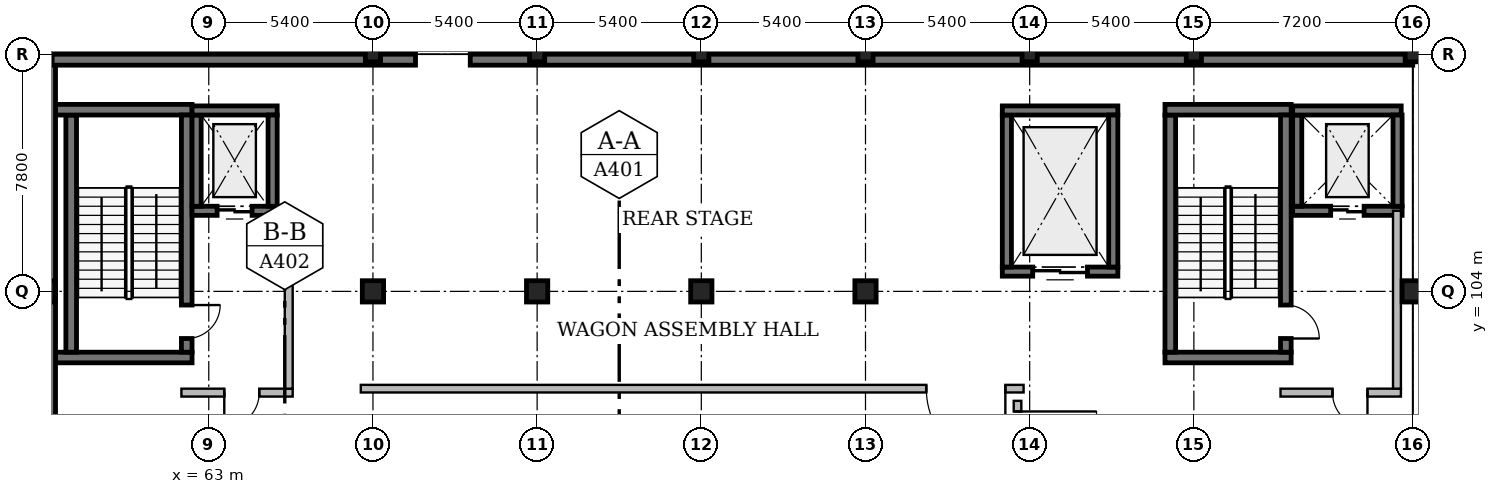
"""IFC4 building model, lengths in metres.
Left out: names, types, materials, properties, quantities, classifications, styles, units other than length and angle.
Written with IfcOpenShell. Run it as: python <this file> out.ifc"""

import sys

from ifc_helpers import new_model, si_unit, direction, frame, frame_2d, origin, origin_2d, place, context, subcontext, project, spatial, rectangle, extrude, element, fill, save


model = new_model("IFC4")
c1 = context("Model", 3, precision=1e-05, world=origin(), true_north=direction((0.0, 1.0)))
c2 = subcontext(c1, "Body", "Model", "MODEL_VIEW")
j1 = project(units=[si_unit("LENGTHUNIT", "METRE"), si_unit("PLANEANGLEUNIT", "RADIAN")], contexts=[c1])
p1 = place(None, origin())
s1 = spatial("IfcSite", under=j1, at=p1, CompositionType="ELEMENT")
p2 = place(p1, origin())
s2 = spatial("IfcBuilding", under=s1, at=p2, CompositionType="ELEMENT")
p3 = place(p2, origin())
s3 = spatial("IfcBuildingStorey", under=s2, at=p3, CompositionType="ELEMENT", Elevation=0.0)
p4 = place(p3, frame((68.4, 104.0, 0.0), z_axis=(0.0, 0.0, 1.0), x_axis=(1.0, 0.0, 0.0)))
e1 = element("IfcColumn", 1, at=p4, inside=s3, PredefinedType="COLUMN", context=c2, shape_type="SweptSolid", body=[
    extrude(rectangle(XDim=0.7, YDim=0.7, at=origin_2d()), origin(), (0.0, 0.0, 1.0), 4.8),
])
p5 = place(p3, frame((68.4, 111.8, 0.0), z_axis=(0.0, 0.0, 1.0), x_axis=(1.0, 0.0, 0.0)))
e2 = element("IfcColumn", 2, at=p5, inside=s3, PredefinedType="COLUMN", context=c2, shape_type="SweptSolid", body=[
    extrude(rectangle(XDim=0.5, YDim=0.5, at=origin_2d()), origin(), (0.0, 0.0, 1.0), 4.8),
])
p6 = place(p3, frame((73.8, 104.0, 0.0), z_axis=(0.0, 0.0, 1.0), x_axis=(1.0, 0.0, 0.0)))
e3 = element("IfcColumn", 3, at=p6, inside=s3, PredefinedType="COLUMN", context=c2, shape_type="SweptSolid", body=[
    extrude(rectangle(XDim=0.7, YDim=0.7, at=origin_2d()), origin(), (0.0, 0.0, 1.0), 4.8),
])
p7 = place(p3, frame((73.8, 111.8, 0.0), z_axis=(0.0, 0.0, 1.0), x_axis=(1.0, 0.0, 0.0)))
e4 = element("IfcColumn", 4, at=p7, inside=s3, PredefinedType="COLUMN", context=c2, shape_type="SweptSolid", body=[
    extrude(rectangle(XDim=0.5, YDim=0.5, at=origin_2d()), origin(), (0.0, 0.0, 1.0), 4.8),
])
p8 = place(p3, frame((79.2, 104.0, 0.0), z_axis=(0.0, 0.0, 1.0), x_axis=(1.0, 0.0, 0.0)))
e5 = element("IfcColumn", 5, at=p8, inside=s3, PredefinedType="COLUMN", context=c2, shape_type="SweptSolid", body=[
    extrude(rectangle(XDim=0.7, YDim=0.7, at=origin_2d()), origin(), (0.0, 0.0, 1.0), 4.8),
])
p9 = place(p3, frame((79.2, 111.8, 0.0), z_axis=(0.0, 0.0, 1.0), x_axis=(1.0, 0.0, 0.0)))
e6 = element("IfcColumn", 6, at=p9, inside=s3, PredefinedType="COLUMN", context=c2, shape_type="SweptSolid", body=[
    extrude(rectangle(XDim=0.5, YDim=0.5, at=origin_2d()), origin(), (0.0, 0.0, 1.0), 4.8),
])
p10 = place(p3, frame((84.6, 104.0, 0.0), z_axis=(0.0, 0.0, 1.0), x_axis=(1.0, 0.0, 0.0)))
e7 = element("IfcColumn", 7, at=p10, inside=s3, PredefinedType="COLUMN", context=c2, shape_type="SweptSolid", body=[
    extrude(rectangle(XDim=0.7, YDim=0.7, at=origin_2d()), origin(), (0.0, 0.0, 1.0), 4.8),
])
for number, where, z_axis, x_axis in (
    (8, (84.6, 111.8, 0.0), (0.0, 0.0, 1.0), (1.0, 0.0, 0.0)),
    (9, (90.0, 111.8, 0.0), (0.0, 0.0, 1.0), (1.0, 0.0, 0.0)),
    (10, (95.4, 111.8, 0.0), (0.0, 0.0, 1.0), (1.0, 0.0, 0.0)),
):
    element("IfcColumn", number, at=place(p3, frame(where, z_axis=z_axis, x_axis=x_axis)), inside=s3, PredefinedType="COLUMN", context=c2, shape_type="SweptSolid", body=[
        extrude(rectangle(XDim=0.5, YDim=0.5, at=origin_2d()), origin(), (0.0, 0.0, 1.0), 4.8),
    ])
p11 = place(p3, frame((102.6, 104.0, 0.0), z_axis=(0.0, 0.0, 1.0), x_axis=(1.0, 0.0, 0.0)))
e11 = element("IfcColumn", 11, at=p11, inside=s3, PredefinedType="COLUMN", context=c2, shape_type="SweptSolid", body=[
    extrude(rectangle(XDim=0.7, YDim=0.7, at=origin_2d()), origin(), (0.0, 0.0, 1.0), 4.8),
])
p12 = place(p3, frame((102.6, 111.8, 0.0), z_axis=(0.0, 0.0, 1.0), x_axis=(1.0, 0.0, 0.0)))
e12 = element("IfcColumn", 12, at=p12, inside=s3, PredefinedType="COLUMN", context=c2, shape_type="SweptSolid", body=[
    extrude(rectangle(XDim=0.5, YDim=0.5, at=origin_2d()), origin(), (0.0, 0.0, 1.0), 4.8),
])
p13 = place(p3, frame((57.6, 104.0, 0.0), z_axis=(0.0, 0.0, 1.0), x_axis=(1.0, 0.0, 0.0)))
e13 = element("IfcColumn", 13, at=p13, inside=s3, PredefinedType="COLUMN", context=c2, shape_type="SweptSolid", body=[
    extrude(rectangle(XDim=0.7, YDim=0.7, at=origin_2d()), origin(), (0.0, 0.0, 1.0), 4.8),
])
p14 = place(p3, frame((57.6, 111.8, 0.0), z_axis=(0.0, 0.0, 1.0), x_axis=(1.0, 0.0, 0.0)))
e14 = element("IfcColumn", 14, at=p14, inside=s3, PredefinedType="COLUMN", context=c2, shape_type="SweptSolid", body=[
    extrude(rectangle(XDim=0.5, YDim=0.5, at=origin_2d()), origin(), (0.0, 0.0, 1.0), 4.8),
])
p15 = place(p3, frame((98.6, 101.825, 0.0), z_axis=(0.0, 0.0, 1.0), x_axis=(-1.0, 0.0, 0.0)))
e15 = element("IfcWall", 15, at=p15, inside=s3, PredefinedType="SOLIDWALL", context=c2, shape_type="SweptSolid", body=[
    extrude(rectangle(XDim=4.15, YDim=0.35, at=frame_2d((2.075, 0.0))), origin(), (0.0, 0.0, 1.0), 4.8),
])
p16 = place(p3, frame((94.625, 102.0, 0.0), z_axis=(0.0, 0.0, 1.0), x_axis=(0.0, 1.0, 0.0)))
e16 = element("IfcWall", 16, at=p16, inside=s3, PredefinedType="SOLIDWALL", context=c2, shape_type="SweptSolid", body=[
    extrude(rectangle(XDim=7.8, YDim=0.35, at=frame_2d((3.9, 0.0))), origin(), (0.0, 0.0, 1.0), 4.8),
])
p17 = place(p3, frame((94.45, 109.975, 0.0), z_axis=(0.0, 0.0, 1.0), x_axis=(1.0, 0.0, 0.0)))
e17 = element("IfcWall", 17, at=p17, inside=s3, PredefinedType="SOLIDWALL", context=c2, shape_type="SweptSolid", body=[
    extrude(rectangle(XDim=4.15, YDim=0.35, at=frame_2d((2.075, 0.0))), origin(), (0.0, 0.0, 1.0), 4.8),
])
p18 = place(p3, frame((98.425, 109.8, 0.0), z_axis=(0.0, 0.0, 1.0), x_axis=(0.0, -1.0, 0.0)))
e18 = element("IfcWall", 18, at=p18, inside=s3, PredefinedType="SOLIDWALL", context=c2, shape_type="SweptSolid", body=[
    extrude(rectangle(XDim=7.8, YDim=0.35, at=frame_2d((3.9, 0.0))), origin(), (0.0, 0.0, 1.0), 4.8),
])
p19 = place(p18, frame((6.25, 0.0, 0.0)))
e19 = element("IfcOpeningElement", 19, at=p19, cuts=e18, PredefinedType="OPENING", context=c2, shape_type="SweptSolid", body=[
    extrude(rectangle(XDim=1.1, YDim=2.15, at=frame_2d((0.55, 1.075))), frame((0.0, 0.195, 0.0), z_axis=(0.0, -1.0, 0.0), x_axis=(1.0, 0.0, 0.0)), (0.0, 0.0, 1.0), 0.39),
])
p20 = place(p3, frame((102.25, 106.65, 0.0), z_axis=(0.0, 0.0, 1.0), x_axis=(-1.0, 0.0, 0.0)))
e20 = element("IfcWall", 20, at=p20, inside=s3, PredefinedType="SOLIDWALL", context=c2, shape_type="SweptSolid", body=[
    extrude(rectangle(XDim=3.6, YDim=0.3, at=frame_2d((1.8, 0.0))), origin(), (0.0, 0.0, 1.0), 4.8),
])
p21 = place(p20, frame((1.25, 0.0, 0.0)))
e21 = element("IfcOpeningElement", 21, at=p21, cuts=e20, PredefinedType="OPENING", context=c2, shape_type="SweptSolid", body=[
    extrude(rectangle(XDim=1.1, YDim=2.1, at=frame_2d((0.55, 1.05))), frame((0.0, 0.17, 0.0), z_axis=(0.0, -1.0, 0.0), x_axis=(1.0, 0.0, 0.0)), (0.0, 0.0, 1.0), 0.34),
])
p22 = place(p3, frame((98.8, 106.8, 0.0), z_axis=(0.0, 0.0, 1.0), x_axis=(0.0, 1.0, 0.0)))
e22 = element("IfcWall", 22, at=p22, inside=s3, PredefinedType="SOLIDWALL", context=c2, shape_type="SweptSolid", body=[
    extrude(rectangle(XDim=3.0, YDim=0.3, at=frame_2d((1.5, 0.0))), origin(), (0.0, 0.0, 1.0), 4.8),
])
p23 = place(p3, frame((98.65, 109.95, 0.0), z_axis=(0.0, 0.0, 1.0), x_axis=(1.0, 0.0, 0.0)))
e23 = element("IfcWall", 23, at=p23, inside=s3, PredefinedType="SOLIDWALL", context=c2, shape_type="SweptSolid", body=[
    extrude(rectangle(XDim=3.57, YDim=0.3, at=frame_2d((1.785, 0.0))), origin(), (0.0, 0.0, 1.0), 4.8),
])
p24 = place(p3, frame((102.1, 109.8, 0.0), z_axis=(0.0, 0.0, 1.0), x_axis=(0.0, -1.0, 0.0)))
e24 = element("IfcWall", 24, at=p24, inside=s3, PredefinedType="SOLIDWALL", context=c2, shape_type="SweptSolid", body=[
    extrude(rectangle(XDim=3.0, YDim=0.3, at=frame_2d((1.5, 0.0))), origin(), (0.0, 0.0, 1.0), 4.8),
])
p25 = place(p3, frame((102.21, 100.67, 0.0), z_axis=(0.0, 0.0, 1.0), x_axis=(-1.0, 0.0, 0.0)))
e25 = element("IfcWall", 25, at=p25, inside=s3, PredefinedType="SOLIDWALL", context=c2, shape_type="SweptSolid", body=[
    extrude(rectangle(XDim=3.96, YDim=0.26, at=frame_2d((1.98, 0.0))), origin(), (0.0, 0.0, 1.0), 4.54),
])
p26 = place(p25, frame((1.1, 0.0, 0.0)))
e26 = element("IfcOpeningElement", 26, at=p26, cuts=e25, PredefinedType="OPENING", context=c2, shape_type="SweptSolid", body=[
    extrude(rectangle(XDim=1.15, YDim=2.2, at=frame_2d((0.575, 1.1))), frame((0.0, 0.15, 0.0), z_axis=(0.0, -1.0, 0.0), x_axis=(1.0, 0.0, 0.0)), (0.0, 0.0, 1.0), 0.3),
])
p27 = place(p3, frame((102.08, 106.65, 0.0), z_axis=(0.0, 0.0, 1.0), x_axis=(0.0, -1.0, 0.0)))
e27 = element("IfcWall", 27, at=p27, inside=s3, PredefinedType="SOLIDWALL", context=c2, shape_type="SweptSolid", body=[
    extrude(rectangle(XDim=5.85, YDim=0.26, at=frame_2d((2.925, 0.0))), origin(), (0.0, 0.0, 1.0), 4.54),
])
p28 = place(p3, frame((62.45, 101.825, 0.0), z_axis=(0.0, 0.0, 1.0), x_axis=(-1.0, 0.0, 0.0)))
e28 = element("IfcWall", 28, at=p28, inside=s3, PredefinedType="SOLIDWALL", context=c2, shape_type="SweptSolid", body=[
    extrude(rectangle(XDim=4.49, YDim=0.35, at=frame_2d((2.245, 0.0))), origin(), (0.0, 0.0, 1.0), 4.8),
])
p29 = place(p3, frame((58.475, 102.0, 0.0), z_axis=(0.0, 0.0, 1.0), x_axis=(0.0, 1.0, 0.0)))
e29 = element("IfcWall", 29, at=p29, inside=s3, PredefinedType="SOLIDWALL", context=c2, shape_type="SweptSolid", body=[
    extrude(rectangle(XDim=7.8, YDim=0.35, at=frame_2d((3.9, 0.0))), origin(), (0.0, 0.0, 1.0), 4.8),
])
p30 = place(p3, frame((57.96, 109.975, 0.0), z_axis=(0.0, 0.0, 1.0), x_axis=(1.0, 0.0, 0.0)))
e30 = element("IfcWall", 30, at=p30, inside=s3, PredefinedType="SOLIDWALL", context=c2, shape_type="SweptSolid", body=[
    extrude(rectangle(XDim=4.49, YDim=0.35, at=frame_2d((2.245, 0.0))), origin(), (0.0, 0.0, 1.0), 4.8),
])
p31 = place(p3, frame((62.275, 109.8, 0.0), z_axis=(0.0, 0.0, 1.0), x_axis=(0.0, -1.0, 0.0)))
e31 = element("IfcWall", 31, at=p31, inside=s3, PredefinedType="SOLIDWALL", context=c2, shape_type="SweptSolid", body=[
    extrude(rectangle(XDim=7.8, YDim=0.35, at=frame_2d((3.9, 0.0))), origin(), (0.0, 0.0, 1.0), 4.8),
])
p32 = place(p31, frame((6.25, 0.0, 0.0)))
e32 = element("IfcOpeningElement", 32, at=p32, cuts=e31, PredefinedType="OPENING", context=c2, shape_type="SweptSolid", body=[
    extrude(rectangle(XDim=1.1, YDim=2.15, at=frame_2d((0.55, 1.075))), frame((0.0, 0.195, 0.0), z_axis=(0.0, -1.0, 0.0), x_axis=(1.0, 0.0, 0.0)), (0.0, 0.0, 1.0), 0.39),
])
p33 = place(p3, frame((65.25, 106.65, 0.0), z_axis=(0.0, 0.0, 1.0), x_axis=(-1.0, 0.0, 0.0)))
e33 = element("IfcWall", 33, at=p33, inside=s3, PredefinedType="SOLIDWALL", context=c2, shape_type="SweptSolid", body=[
    extrude(rectangle(XDim=2.8, YDim=0.3, at=frame_2d((1.4, 0.0))), origin(), (0.0, 0.0, 1.0), 4.8),
])
p34 = place(p33, frame((0.825, 0.0, 0.0)))
e34 = element("IfcOpeningElement", 34, at=p34, cuts=e33, PredefinedType="OPENING", context=c2, shape_type="SweptSolid", body=[
    extrude(rectangle(XDim=1.15, YDim=2.1, at=frame_2d((0.575, 1.05))), frame((0.0, 0.17, 0.0), z_axis=(0.0, -1.0, 0.0), x_axis=(1.0, 0.0, 0.0)), (0.0, 0.0, 1.0), 0.34),
])
p35 = place(p3, frame((62.6, 106.8, 0.0), z_axis=(0.0, 0.0, 1.0), x_axis=(0.0, 1.0, 0.0)))
e35 = element("IfcWall", 35, at=p35, inside=s3, PredefinedType="SOLIDWALL", context=c2, shape_type="SweptSolid", body=[
    extrude(rectangle(XDim=3.0, YDim=0.3, at=frame_2d((1.5, 0.0))), origin(), (0.0, 0.0, 1.0), 4.8),
])
p36 = place(p3, frame((62.45, 109.95, 0.0), z_axis=(0.0, 0.0, 1.0), x_axis=(1.0, 0.0, 0.0)))
e36 = element("IfcWall", 36, at=p36, inside=s3, PredefinedType="SOLIDWALL", context=c2, shape_type="SweptSolid", body=[
    extrude(rectangle(XDim=2.8, YDim=0.3, at=frame_2d((1.4, 0.0))), origin(), (0.0, 0.0, 1.0), 4.8),
])
p37 = place(p3, frame((65.1, 109.8, 0.0), z_axis=(0.0, 0.0, 1.0), x_axis=(0.0, -1.0, 0.0)))
e37 = element("IfcWall", 37, at=p37, inside=s3, PredefinedType="SOLIDWALL", context=c2, shape_type="SweptSolid", body=[
    extrude(rectangle(XDim=3.0, YDim=0.3, at=frame_2d((1.5, 0.0))), origin(), (0.0, 0.0, 1.0), 4.8),
])
p38 = place(p3, frame((65.76, 100.67, 0.0), z_axis=(0.0, 0.0, 1.0), x_axis=(-1.0, 0.0, 0.0)))
e38 = element("IfcWall", 38, at=p38, inside=s3, PredefinedType="SOLIDWALL", context=c2, shape_type="SweptSolid", body=[
    extrude(rectangle(XDim=3.66, YDim=0.26, at=frame_2d((1.83, 0.0))), origin(), (0.0, 0.0, 1.0), 4.54),
])
p39 = place(p38, frame((1.1, 0.0, 0.0)))
e39 = element("IfcOpeningElement", 39, at=p39, cuts=e38, PredefinedType="OPENING", context=c2, shape_type="SweptSolid", body=[
    extrude(rectangle(XDim=1.15, YDim=2.2, at=frame_2d((0.575, 1.1))), frame((0.0, 0.15, 0.0), z_axis=(0.0, -1.0, 0.0), x_axis=(1.0, 0.0, 0.0)), (0.0, 0.0, 1.0), 0.3),
])
p40 = place(p3, frame((65.63, 106.65, 0.0), z_axis=(0.0, 0.0, 1.0), x_axis=(0.0, -1.0, 0.0)))
e40 = element("IfcWall", 40, at=p40, inside=s3, PredefinedType="SOLIDWALL", context=c2, shape_type="SweptSolid", body=[
    extrude(rectangle(XDim=5.85, YDim=0.26, at=frame_2d((2.925, 0.0))), origin(), (0.0, 0.0, 1.0), 4.54),
])
p41 = place(p3, frame((92.9, 104.65, 0.0), z_axis=(0.0, 0.0, 1.0), x_axis=(-1.0, 0.0, 0.0)))
e41 = element("IfcWall", 41, at=p41, inside=s3, PredefinedType="SOLIDWALL", context=c2, shape_type="SweptSolid", body=[
    extrude(rectangle(XDim=3.8, YDim=0.3, at=frame_2d((1.9, 0.0))), origin(), (0.0, 0.0, 1.0), 4.8),
])
p42 = place(p41, frame((1.0, 0.0, 0.0)))
e42 = element("IfcOpeningElement", 42, at=p42, cuts=e41, PredefinedType="OPENING", context=c2, shape_type="SweptSolid", body=[
    extrude(rectangle(XDim=1.8, YDim=2.4, at=frame_2d((0.9, 1.2))), frame((0.0, 0.17, 0.0), z_axis=(0.0, -1.0, 0.0), x_axis=(1.0, 0.0, 0.0)), (0.0, 0.0, 1.0), 0.34),
])
p43 = place(p3, frame((89.25, 104.8, 0.0), z_axis=(0.0, 0.0, 1.0), x_axis=(0.0, 1.0, 0.0)))
e43 = element("IfcWall", 43, at=p43, inside=s3, PredefinedType="SOLIDWALL", context=c2, shape_type="SweptSolid", body=[
    extrude(rectangle(XDim=5.0, YDim=0.3, at=frame_2d((2.5, 0.0))), origin(), (0.0, 0.0, 1.0), 4.8),
])
p44 = place(p3, frame((89.1, 109.95, 0.0), z_axis=(0.0, 0.0, 1.0), x_axis=(1.0, 0.0, 0.0)))
e44 = element("IfcWall", 44, at=p44, inside=s3, PredefinedType="SOLIDWALL", context=c2, shape_type="SweptSolid", body=[
    extrude(rectangle(XDim=3.8, YDim=0.3, at=frame_2d((1.9, 0.0))), origin(), (0.0, 0.0, 1.0), 4.8),
])
p45 = place(p3, frame((92.75, 109.8, 0.0), z_axis=(0.0, 0.0, 1.0), x_axis=(0.0, -1.0, 0.0)))
e45 = element("IfcWall", 45, at=p45, inside=s3, PredefinedType="SOLIDWALL", context=c2, shape_type="SweptSolid", body=[
    extrude(rectangle(XDim=5.0, YDim=0.3, at=frame_2d((2.5, 0.0))), origin(), (0.0, 0.0, 1.0), 4.8),
])
p46 = place(p3, frame((57.78, 87.8, 0.0), z_axis=(0.0, 0.0, 1.0), x_axis=(0.0, 1.0, 0.0)))
e46 = element("IfcWall", 46, at=p46, inside=s3, PredefinedType="SOLIDWALL", context=c2, shape_type="SweptSolid", body=[
    extrude(rectangle(XDim=24.0, YDim=0.36, at=frame_2d((12.0, 0.0))), origin(), (0.0, 0.0, 1.0), 4.54),
])
p47 = place(p3, frame((57.6, 111.62, 0.0), z_axis=(0.0, 0.0, 1.0), x_axis=(1.0, 0.0, 0.0)))
e47 = element("IfcWall", 47, at=p47, inside=s3, PredefinedType="SOLIDWALL", context=c2, shape_type="SweptSolid", body=[
    extrude(rectangle(XDim=45.0, YDim=0.36, at=frame_2d((22.5, 0.0))), origin(), (0.0, 0.0, 1.0), 4.54),
])
p48 = place(p47, frame((12.2, 0.0, 0.0)))
e48 = element("IfcOpeningElement", 48, at=p48, cuts=e47, PredefinedType="OPENING", context=c2, shape_type="SweptSolid", body=[
    extrude(rectangle(XDim=1.8, YDim=2.2, at=frame_2d((0.9, 1.1))), frame((0.0, 0.2, 0.0), z_axis=(0.0, -1.0, 0.0), x_axis=(1.0, 0.0, 0.0)), (0.0, 0.0, 1.0), 0.4),
])
p49 = place(p3, frame((89.6, 100.4, 0.0), z_axis=(0.0, 0.0, 1.0), x_axis=(0.0, -1.0, 0.0)))
e49 = element("IfcWall", 49, at=p49, inside=s3, PredefinedType="PARTITIONING", context=c2, shape_type="SweptSolid", body=[
    extrude(rectangle(XDim=3.83, YDim=0.25, at=frame_2d((1.915, 0.0))), origin(), (0.0, 0.0, 1.0), 4.54),
])
p50 = place(p49, frame((0.35, 0.0, 0.0)))
e50 = element("IfcOpeningElement", 50, at=p50, cuts=e49, PredefinedType="OPENING", context=c2, shape_type="SweptSolid", body=[
    extrude(rectangle(XDim=2.6, YDim=3.2, at=frame_2d((1.3, 1.6))), frame((0.0, 0.145, 0.0), z_axis=(0.0, -1.0, 0.0), x_axis=(1.0, 0.0, 0.0)), (0.0, 0.0, 1.0), 0.29),
])
p51 = place(p3, frame((89.8, 100.8, 0.0), z_axis=(0.0, 0.0, 1.0), x_axis=(-1.0, 0.0, 0.0)))
e51 = element("IfcWall", 51, at=p51, inside=s3, PredefinedType="PARTITIONING", context=c2, shape_type="SweptSolid", body=[
    extrude(rectangle(XDim=21.8, YDim=0.25, at=frame_2d((10.9, 0.0))), origin(), (0.0, 0.0, 1.0), 4.56),
])
p52 = place(p51, frame((0.6, 0.0, 0.0)))
e52 = element("IfcOpeningElement", 52, at=p52, cuts=e51, PredefinedType="OPENING", context=c2, shape_type="SweptSolid", body=[
    extrude(rectangle(XDim=2.6, YDim=3.2, at=frame_2d((1.3, 1.6))), frame((0.0, 0.145, 0.0), z_axis=(0.0, -1.0, 0.0), x_axis=(1.0, 0.0, 0.0)), (0.0, 0.0, 1.0), 0.29),
])
p53 = place(p19, origin())
e53 = element("IfcDoor", 53, at=p53, inside=s3, OperationType="SINGLE_SWING_RIGHT", PredefinedType="DOOR", context=c2, shape_type="SweptSolid", body=[
    extrude(rectangle(XDim=1.1, YDim=2.15, at=frame_2d((0.55, 1.075))), frame((0.0, 0.025, 0.0), z_axis=(0.0, -1.0, 0.0), x_axis=(1.0, 0.0, 0.0)), (0.0, 0.0, 1.0), 0.05),
])
fill(e19, e53)
p54 = place(p21, origin())
e54 = element("IfcDoor", 54, at=p54, inside=s3, OperationType="DOUBLE_DOOR_SLIDING", PredefinedType="DOOR", context=c2, shape_type="SweptSolid", body=[
    extrude(rectangle(XDim=1.1, YDim=2.1, at=frame_2d((0.55, 1.05))), frame((0.0, 0.025, 0.0), z_axis=(0.0, -1.0, 0.0), x_axis=(1.0, 0.0, 0.0)), (0.0, 0.0, 1.0), 0.05),
])
fill(e21, e54)
p55 = place(p26, origin())
e55 = element("IfcDoor", 55, at=p55, inside=s3, OperationType="SINGLE_SWING_LEFT", PredefinedType="DOOR", context=c2, shape_type="SweptSolid", body=[
    extrude(rectangle(XDim=1.15, YDim=2.2, at=frame_2d((0.575, 1.1))), frame((0.0, 0.025, 0.0), z_axis=(0.0, -1.0, 0.0), x_axis=(1.0, 0.0, 0.0)), (0.0, 0.0, 1.0), 0.05),
])
fill(e26, e55)
p56 = place(p32, origin())
e56 = element("IfcDoor", 56, at=p56, inside=s3, OperationType="SINGLE_SWING_LEFT", PredefinedType="DOOR", context=c2, shape_type="SweptSolid", body=[
    extrude(rectangle(XDim=1.1, YDim=2.15, at=frame_2d((0.55, 1.075))), frame((0.0, 0.025, 0.0), z_axis=(0.0, -1.0, 0.0), x_axis=(1.0, 0.0, 0.0)), (0.0, 0.0, 1.0), 0.05),
])
fill(e32, e56)
p57 = place(p34, origin())
e57 = element("IfcDoor", 57, at=p57, inside=s3, OperationType="DOUBLE_DOOR_SLIDING", PredefinedType="DOOR", context=c2, shape_type="SweptSolid", body=[
    extrude(rectangle(XDim=1.15, YDim=2.1, at=frame_2d((0.575, 1.05))), frame((0.0, 0.025, 0.0), z_axis=(0.0, -1.0, 0.0), x_axis=(1.0, 0.0, 0.0)), (0.0, 0.0, 1.0), 0.05),
])
fill(e34, e57)
p58 = place(p39, origin())
e58 = element("IfcDoor", 58, at=p58, inside=s3, OperationType="SINGLE_SWING_RIGHT", PredefinedType="DOOR", context=c2, shape_type="SweptSolid", body=[
    extrude(rectangle(XDim=1.15, YDim=2.2, at=frame_2d((0.575, 1.1))), frame((0.0, 0.025, 0.0), z_axis=(0.0, -1.0, 0.0), x_axis=(1.0, 0.0, 0.0)), (0.0, 0.0, 1.0), 0.05),
])
fill(e39, e58)
p59 = place(p42, origin())
e59 = element("IfcDoor", 59, at=p59, inside=s3, OperationType="DOUBLE_DOOR_SLIDING", PredefinedType="DOOR", context=c2, shape_type="SweptSolid", body=[
    extrude(rectangle(XDim=1.8, YDim=2.4, at=frame_2d((0.9, 1.2))), frame((0.0, 0.025, 0.0), z_axis=(0.0, -1.0, 0.0), x_axis=(1.0, 0.0, 0.0)), (0.0, 0.0, 1.0), 0.05),
])
fill(e42, e59)
p60 = place(p48, origin())
e60 = element("IfcDoor", 60, at=p60, inside=s3, OperationType="SINGLE_SWING_LEFT", PredefinedType="DOOR", context=c2, shape_type="SweptSolid", body=[
    extrude(rectangle(XDim=1.8, YDim=2.2, at=frame_2d((0.9, 1.1))), frame((0.0, 0.025, 0.0), z_axis=(0.0, -1.0, 0.0), x_axis=(1.0, 0.0, 0.0)), (0.0, 0.0, 1.0), 0.05),
])
fill(e48, e60)
p61 = place(p50, origin())
e61 = element("IfcDoor", 61, at=p61, inside=s3, OperationType="DOUBLE_DOOR_SINGLE_SWING", PredefinedType="DOOR", context=c2, shape_type="SweptSolid", body=[
    extrude(rectangle(XDim=2.6, YDim=3.2, at=frame_2d((1.3, 1.6))), frame((0.0, 0.025, 0.0), z_axis=(0.0, -1.0, 0.0), x_axis=(1.0, 0.0, 0.0)), (0.0, 0.0, 1.0), 0.05),
])
fill(e50, e61)
p62 = place(p52, origin())
e62 = element("IfcDoor", 62, at=p62, inside=s3, OperationType="DOUBLE_DOOR_SINGLE_SWING", PredefinedType="DOOR", context=c2, shape_type="SweptSolid", body=[
    extrude(rectangle(XDim=2.6, YDim=3.2, at=frame_2d((1.3, 1.6))), frame((0.0, 0.025, 0.0), z_axis=(0.0, -1.0, 0.0), x_axis=(1.0, 0.0, 0.0)), (0.0, 0.0, 1.0), 0.05),
])
fill(e52, e62)
save(model, sys.argv[1])
